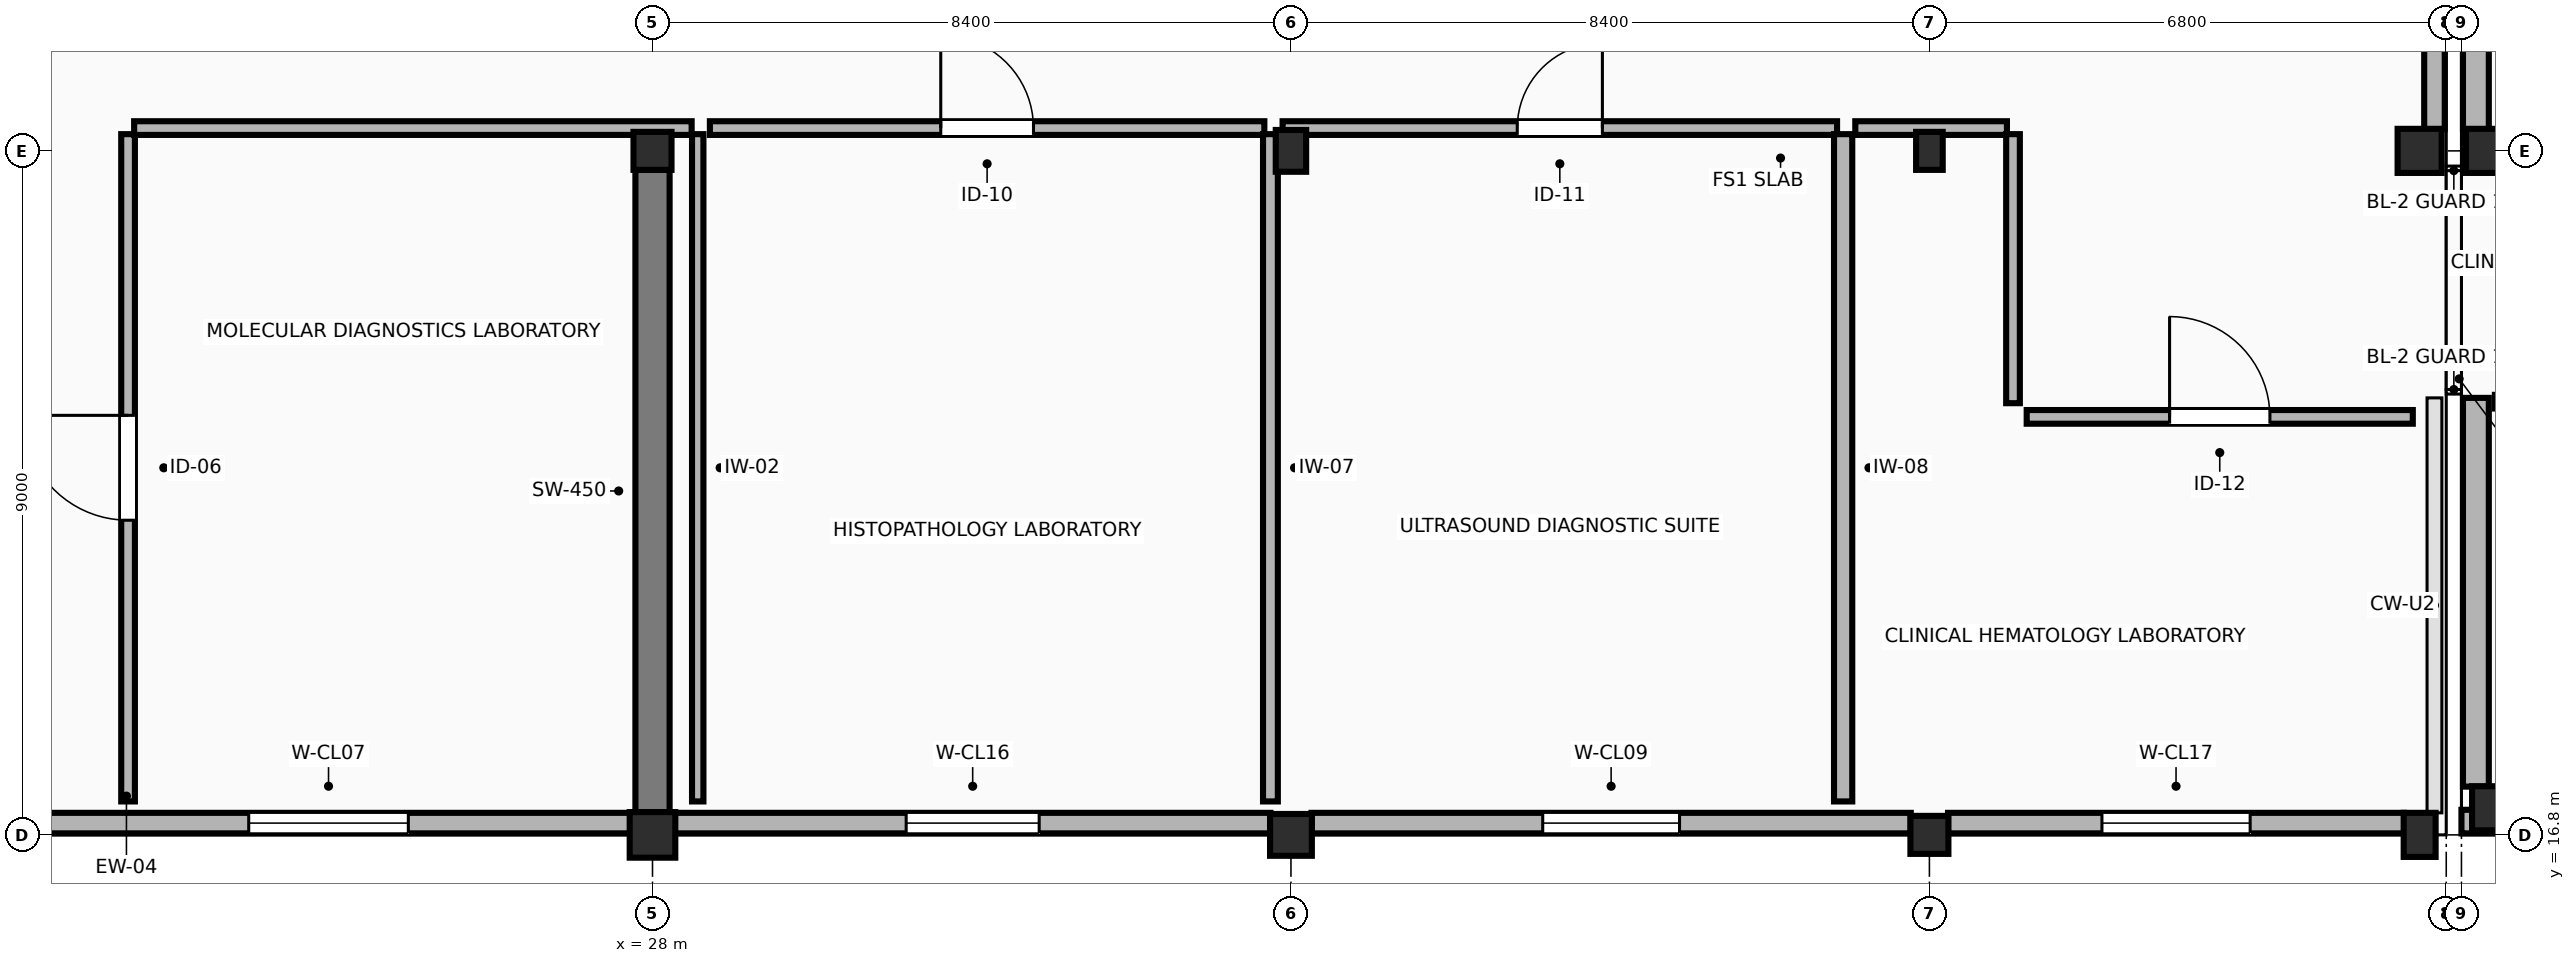
"""IFC4 building model, lengths in metres.
Left out: names, types, materials, properties, quantities, classifications, styles, units other than length and angle.
Written with IfcOpenShell. Run it as: python <this file> out.ifc"""

import sys

from ifc_helpers import new_model, si_unit, direction, frame, frame_2d, origin, origin_2d, place, context, subcontext, project, spatial, polyline, rectangle, outline, extrude, element, fill, save


model = new_model("IFC4")
c1 = context("Model", 3, precision=1e-05, world=origin(), true_north=direction((0.0, 1.0)))
c2 = subcontext(c1, "Body", "Model", "MODEL_VIEW")
j1 = project(units=[si_unit("LENGTHUNIT", "METRE"), si_unit("PLANEANGLEUNIT", "RADIAN")], contexts=[c1])
p1 = place(None, origin())
s1 = spatial("IfcSite", under=j1, at=p1, CompositionType="ELEMENT")
p2 = place(p1, origin())
s2 = spatial("IfcBuilding", under=s1, at=p2, CompositionType="ELEMENT")
p3 = place(p2, frame((0.0, 0.0, 9.6)))
s3 = spatial("IfcBuildingStorey", under=s2, at=p3, CompositionType="ELEMENT", Elevation=9.6)
p4 = place(p3, frame((28.0, 16.8, 0.0), z_axis=(0.0, 0.0, 1.0), x_axis=(1.0, 0.0, 0.0)))
e1 = element("IfcColumn", 1, at=p4, inside=s3, PredefinedType="COLUMN", context=c2, shape_type="SweptSolid", body=[
    extrude(rectangle(XDim=0.6, YDim=0.6, at=origin_2d()), origin(), (0.0, 0.0, 1.0), 4.2),
])
p5 = place(p3, frame((28.0, 25.8, 0.0), z_axis=(0.0, 0.0, 1.0), x_axis=(1.0, 0.0, 0.0)))
e2 = element("IfcColumn", 2, at=p5, inside=s3, PredefinedType="COLUMN", context=c2, shape_type="SweptSolid", body=[
    extrude(rectangle(XDim=0.5, YDim=0.5, at=origin_2d()), origin(), (0.0, 0.0, 1.0), 4.2),
])
p6 = place(p3, frame((36.4, 16.8, 0.0), z_axis=(0.0, 0.0, 1.0), x_axis=(1.0, 0.0, 0.0)))
e3 = element("IfcColumn", 3, at=p6, inside=s3, PredefinedType="COLUMN", context=c2, shape_type="SweptSolid", body=[
    extrude(rectangle(XDim=0.55, YDim=0.55, at=origin_2d()), origin(), (0.0, 0.0, 1.0), 4.2),
])
p7 = place(p3, frame((36.4, 25.8, 0.0), z_axis=(0.0, 0.0, 1.0), x_axis=(1.0, 0.0, 0.0)))
e4 = element("IfcColumn", 4, at=p7, inside=s3, PredefinedType="COLUMN", context=c2, shape_type="SweptSolid", body=[
    extrude(rectangle(XDim=0.4, YDim=0.55, at=origin_2d()), origin(), (0.0, 0.0, 1.0), 4.2),
])
p8 = place(p3, frame((44.8, 16.8, 0.0), z_axis=(0.0, 0.0, 1.0), x_axis=(1.0, 0.0, 0.0)))
e5 = element("IfcColumn", 5, at=p8, inside=s3, PredefinedType="COLUMN", context=c2, shape_type="SweptSolid", body=[
    extrude(rectangle(XDim=0.5, YDim=0.5, at=origin_2d()), origin(), (0.0, 0.0, 1.0), 4.2),
])
p9 = place(p3, frame((44.8, 25.8, 0.0), z_axis=(0.0, 0.0, 1.0), x_axis=(1.0, 0.0, 0.0)))
e6 = element("IfcColumn", 6, at=p9, inside=s3, PredefinedType="COLUMN", context=c2, shape_type="SweptSolid", body=[
    extrude(rectangle(XDim=0.35, YDim=0.5, at=origin_2d()), origin(), (0.0, 0.0, 1.0), 4.2),
])
p10 = place(p3, frame((51.25, 16.8, 0.0), z_axis=(0.0, 0.0, 1.0), x_axis=(1.0, 0.0, 0.0)))
e7 = element("IfcColumn", 7, at=p10, inside=s3, PredefinedType="COLUMN", context=c2, shape_type="SweptSolid", body=[
    extrude(rectangle(XDim=0.42, YDim=0.58, at=origin_2d()), origin(), (0.0, 0.0, 1.0), 4.2),
])
p11 = place(p3, frame((51.25, 25.8, 0.0), z_axis=(0.0, 0.0, 1.0), x_axis=(1.0, 0.0, 0.0)))
e8 = element("IfcColumn", 8, at=p11, inside=s3, PredefinedType="COLUMN", context=c2, shape_type="SweptSolid", body=[
    extrude(rectangle(XDim=0.58, YDim=0.58, at=origin_2d()), origin(), (0.0, 0.0, 1.0), 4.2),
])
p12 = place(p3, frame((52.15, 17.15, 0.0), z_axis=(0.0, 0.0, 1.0), x_axis=(1.0, 0.0, 0.0)))
e9 = element("IfcColumn", 9, at=p12, inside=s3, PredefinedType="COLUMN", context=c2, shape_type="SweptSolid", body=[
    extrude(rectangle(XDim=0.42, YDim=0.58, at=origin_2d()), origin(), (0.0, 0.0, 1.0), 4.2),
])
p13 = place(p3, frame((52.15, 25.8, 0.0), z_axis=(0.0, 0.0, 1.0), x_axis=(1.0, 0.0, 0.0)))
e10 = element("IfcColumn", 10, at=p13, inside=s3, PredefinedType="COLUMN", context=c2, shape_type="SweptSolid", body=[
    extrude(rectangle(XDim=0.58, YDim=0.58, at=origin_2d()), origin(), (0.0, 0.0, 1.0), 4.2),
])
p14 = place(p3, frame((19.77, 16.955, 0.0), z_axis=(0.0, 0.0, 1.0), x_axis=(1.0, 0.0, 0.0)))
e11 = element("IfcWall", 11, at=p14, inside=s3, PredefinedType="STANDARD", context=c2, shape_type="SweptSolid", body=[
    extrude(rectangle(XDim=7.935, YDim=0.27, at=frame_2d((3.968, 0.0))), origin(), (0.0, 0.0, 1.0), 3.255),
])
p15 = place(p14, frame((2.917, 0.0, 0.95)))
e12 = element("IfcOpeningElement", 12, at=p15, cuts=e11, PredefinedType="OPENING", context=c2, shape_type="SweptSolid", body=[
    extrude(rectangle(XDim=2.1, YDim=1.8, at=frame_2d((1.05, 0.9))), frame((0.0, 0.145, 0.0), z_axis=(0.0, -1.0, 0.0), x_axis=(1.0, 0.0, 0.0)), (0.0, 0.0, 1.0), 0.29),
])
p16 = place(p3, frame((28.295, 16.955, 0.0), z_axis=(0.0, 0.0, 1.0), x_axis=(1.0, 0.0, 0.0)))
e13 = element("IfcWall", 13, at=p16, inside=s3, PredefinedType="STANDARD", context=c2, shape_type="SweptSolid", body=[
    extrude(rectangle(XDim=7.835, YDim=0.27, at=frame_2d((3.917, 0.0))), origin(), (0.0, 0.0, 1.0), 3.255),
])
p17 = place(p16, frame((3.042, 0.0, 0.95)))
e14 = element("IfcOpeningElement", 14, at=p17, cuts=e13, PredefinedType="OPENING", context=c2, shape_type="SweptSolid", body=[
    extrude(rectangle(XDim=1.75, YDim=1.65, at=frame_2d((0.875, 0.825))), frame((0.0, 0.145, 0.0), z_axis=(0.0, -1.0, 0.0), x_axis=(1.0, 0.0, 0.0)), (0.0, 0.0, 1.0), 0.29),
])
p18 = place(p3, frame((36.67, 16.955, 0.0), z_axis=(0.0, 0.0, 1.0), x_axis=(1.0, 0.0, 0.0)))
e15 = element("IfcWall", 15, at=p18, inside=s3, PredefinedType="STANDARD", context=c2, shape_type="SweptSolid", body=[
    extrude(rectangle(XDim=7.885, YDim=0.27, at=frame_2d((3.942, 0.0))), origin(), (0.0, 0.0, 1.0), 3.225),
])
p19 = place(p18, frame((3.042, 0.0, 1.75)))
e16 = element("IfcOpeningElement", 16, at=p19, cuts=e15, PredefinedType="OPENING", context=c2, shape_type="SweptSolid", body=[
    extrude(rectangle(XDim=1.8, YDim=0.9, at=frame_2d((0.9, 0.45))), frame((0.0, 0.145, 0.0), z_axis=(0.0, -1.0, 0.0), x_axis=(1.0, 0.0, 0.0)), (0.0, 0.0, 1.0), 0.29),
])
p20 = place(p3, frame((45.045, 16.955, 0.0), z_axis=(0.0, 0.0, 1.0), x_axis=(1.0, 0.0, 0.0)))
e17 = element("IfcWall", 17, at=p20, inside=s3, PredefinedType="STANDARD", context=c2, shape_type="SweptSolid", body=[
    extrude(rectangle(XDim=6.0, YDim=0.27, at=frame_2d((3.0, 0.0))), origin(), (0.0, 0.0, 1.0), 3.425),
])
p21 = place(p20, frame((2.025, 0.0, 0.95)))
e18 = element("IfcOpeningElement", 18, at=p21, cuts=e17, PredefinedType="OPENING", context=c2, shape_type="SweptSolid", body=[
    extrude(rectangle(XDim=1.95, YDim=1.55, at=frame_2d((0.975, 0.775))), frame((0.0, 0.145, 0.0), z_axis=(0.0, -1.0, 0.0), x_axis=(1.0, 0.0, 0.0)), (0.0, 0.0, 1.0), 0.29),
])
p22 = place(p3, frame((51.445, 26.085, 0.0), z_axis=(0.0, 0.0, 1.0), x_axis=(0.0, 1.0, 0.0)))
e19 = element("IfcWall", 19, at=p22, inside=s3, PredefinedType="STANDARD", context=c2, shape_type="SweptSolid", body=[
    extrude(rectangle(XDim=8.28, YDim=0.27, at=frame_2d((4.14, 0.0))), origin(), (0.0, 0.0, 1.0), 3.335),
])
p23 = place(p3, frame((51.99, 34.015, 0.0), z_axis=(0.0, 0.0, 1.0), x_axis=(0.0, -1.0, 0.0)))
e20 = element("IfcWall", 20, at=p23, inside=s3, PredefinedType="STANDARD", context=c2, shape_type="SweptSolid", body=[
    extrude(rectangle(XDim=7.93, YDim=0.34, at=frame_2d((3.965, 0.0))), origin(), (0.0, 0.0, 1.0), 3.035),
])
p24 = place(p3, frame((51.99, 22.55, 0.0), z_axis=(0.0, 0.0, 1.0), x_axis=(0.0, -1.0, 0.0)))
e21 = element("IfcWall", 21, at=p24, inside=s3, PredefinedType="STANDARD", context=c2, shape_type="SweptSolid", body=[
    extrude(rectangle(XDim=5.115, YDim=0.34, at=frame_2d((2.558, 0.0))), origin(), (0.0, 0.0, 1.0), 3.035),
])
p25 = place(p3, frame((51.8, 16.975, 4.2), z_axis=(0.0, 0.0, 1.0), x_axis=(1.0, 0.0, 0.0)))
e22 = element("IfcWall", 22, at=p25, inside=s3, PredefinedType="STANDARD", context=c2, shape_type="SweptSolid", body=[
    extrude(outline(polyline([(0.0, 0.0), (9.6, 0.0), (9.6, 0.0), (4.8, 7.09), (0.0, 0.0), (0.0, 0.0)])), frame((0.0, 0.155, 0.0), z_axis=(0.0, -1.0, 0.0), x_axis=(1.0, 0.0, 0.0)), (0.0, 0.0, 1.0), 0.31),
])
p26 = place(p25, frame((2.622, 0.0, 0.75)))
e23 = element("IfcOpeningElement", 23, at=p26, cuts=e22, PredefinedType="OPENING", context=c2, shape_type="SweptSolid", body=[
    extrude(rectangle(XDim=0.9, YDim=0.9, at=frame_2d((0.45, 0.45))), frame((0.0, 0.165, 0.0), z_axis=(0.0, -1.0, 0.0), x_axis=(1.0, 0.0, 0.0)), (0.0, 0.0, 1.0), 0.33),
])
p27 = place(p25, frame((5.886, 0.0, 1.55)))
e24 = element("IfcOpeningElement", 24, at=p27, cuts=e22, PredefinedType="OPENING", context=c2, shape_type="SweptSolid", body=[
    extrude(rectangle(XDim=0.9, YDim=0.9, at=frame_2d((0.45, 0.45))), frame((0.0, 0.165, 0.0), z_axis=(0.0, -1.0, 0.0), x_axis=(1.0, 0.0, 0.0)), (0.0, 0.0, 1.0), 0.33),
])
p28 = place(p25, frame((4.35, 0.0, 3.35)))
e25 = element("IfcOpeningElement", 25, at=p28, cuts=e22, PredefinedType="OPENING", context=c2, shape_type="SweptSolid", body=[
    extrude(rectangle(XDim=0.9, YDim=0.9, at=frame_2d((0.45, 0.45))), frame((0.0, 0.165, 0.0), z_axis=(0.0, -1.0, 0.0), x_axis=(1.0, 0.0, 0.0)), (0.0, 0.0, 1.0), 0.33),
])
p29 = place(p3, frame((28.0, 17.1, 0.0), z_axis=(0.0, 0.0, 1.0), x_axis=(0.0, 1.0, 0.0)))
e26 = element("IfcWall", 26, at=p29, inside=s3, PredefinedType="SHEAR", context=c2, shape_type="SweptSolid", body=[
    extrude(rectangle(XDim=8.45, YDim=0.45, at=frame_2d((4.225, 0.0))), origin(), (0.0, 0.0, 1.0), 3.92),
])
p30 = place(p3, frame((21.1, 17.24, 0.0), z_axis=(0.0, 0.0, 1.0), x_axis=(0.0, 1.0, 0.0)))
e27 = element("IfcWall", 27, at=p30, inside=s3, PredefinedType="PARTITIONING", context=c2, shape_type="SweptSolid", body=[
    extrude(rectangle(XDim=8.78, YDim=0.18, at=frame_2d((4.39, 0.0))), origin(), (0.0, 0.0, 1.0), 3.92),
])
p31 = place(p30, frame((3.7, 0.0, 0.0)))
e28 = element("IfcOpeningElement", 28, at=p31, cuts=e27, PredefinedType="OPENING", context=c2, shape_type="SweptSolid", body=[
    extrude(rectangle(XDim=1.38, YDim=2.25, at=frame_2d((0.69, 1.125))), frame((0.0, 0.1, 0.0), z_axis=(0.0, -1.0, 0.0), x_axis=(1.0, 0.0, 0.0)), (0.0, 0.0, 1.0), 0.2),
])
p32 = place(p3, frame((21.18, 26.1, 0.0), z_axis=(0.0, 0.0, 1.0), x_axis=(1.0, 0.0, 0.0)))
e29 = element("IfcWall", 29, at=p32, inside=s3, PredefinedType="PARTITIONING", context=c2, shape_type="SweptSolid", body=[
    extrude(rectangle(XDim=7.335, YDim=0.18, at=frame_2d((3.667, 0.0))), origin(), (0.0, 0.0, 1.0), 3.255),
])
p33 = place(p3, frame((28.595, 26.02, 0.0), z_axis=(0.0, 0.0, 1.0), x_axis=(0.0, -1.0, 0.0)))
e30 = element("IfcWall", 30, at=p33, inside=s3, PredefinedType="PARTITIONING", context=c2, shape_type="SweptSolid", body=[
    extrude(rectangle(XDim=8.78, YDim=0.15, at=frame_2d((4.39, 0.0))), origin(), (0.0, 0.0, 1.0), 3.92),
])
p34 = place(p3, frame((28.755, 26.1, 0.0), z_axis=(0.0, 0.0, 1.0), x_axis=(1.0, 0.0, 0.0)))
e31 = element("IfcWall", 31, at=p34, inside=s3, PredefinedType="PARTITIONING", context=c2, shape_type="SweptSolid", body=[
    extrude(rectangle(XDim=7.295, YDim=0.18, at=frame_2d((3.647, 0.0))), origin(), (0.0, 0.0, 1.0), 3.255),
])
p35 = place(p34, frame((3.038, 0.0, 0.0)))
e32 = element("IfcOpeningElement", 32, at=p35, cuts=e31, PredefinedType="OPENING", context=c2, shape_type="SweptSolid", body=[
    extrude(rectangle(XDim=1.22, YDim=2.18, at=frame_2d((0.61, 1.09))), frame((0.0, 0.1, 0.0), z_axis=(0.0, -1.0, 0.0), x_axis=(1.0, 0.0, 0.0)), (0.0, 0.0, 1.0), 0.2),
])
p36 = place(p3, frame((36.13, 26.02, 0.0), z_axis=(0.0, 0.0, 1.0), x_axis=(0.0, -1.0, 0.0)))
e33 = element("IfcWall", 33, at=p36, inside=s3, PredefinedType="PARTITIONING", context=c2, shape_type="SweptSolid", body=[
    extrude(rectangle(XDim=8.78, YDim=0.195, at=frame_2d((4.39, 0.0))), origin(), (0.0, 0.0, 1.0), 3.375),
])
p37 = place(p3, frame((36.29, 26.1, 0.0), z_axis=(0.0, 0.0, 1.0), x_axis=(1.0, 0.0, 0.0)))
e34 = element("IfcWall", 34, at=p37, inside=s3, PredefinedType="PARTITIONING", context=c2, shape_type="SweptSolid", body=[
    extrude(rectangle(XDim=7.295, YDim=0.18, at=frame_2d((3.647, 0.0))), origin(), (0.0, 0.0, 1.0), 3.225),
])
p38 = place(p37, frame((3.087, 0.0, 0.0)))
e35 = element("IfcOpeningElement", 35, at=p38, cuts=e34, PredefinedType="OPENING", context=c2, shape_type="SweptSolid", body=[
    extrude(rectangle(XDim=1.12, YDim=2.16, at=frame_2d((0.56, 1.08))), frame((0.0, 0.1, 0.0), z_axis=(0.0, -1.0, 0.0), x_axis=(1.0, 0.0, 0.0)), (0.0, 0.0, 1.0), 0.2),
])
p39 = place(p3, frame((43.665, 26.02, 0.0), z_axis=(0.0, 0.0, 1.0), x_axis=(0.0, -1.0, 0.0)))
e36 = element("IfcWall", 36, at=p39, inside=s3, PredefinedType="PARTITIONING", context=c2, shape_type="SweptSolid", body=[
    extrude(rectangle(XDim=8.78, YDim=0.24, at=frame_2d((4.39, 0.0))), origin(), (0.0, 0.0, 1.0), 3.92),
])
p40 = place(p3, frame((43.825, 26.1, 0.0), z_axis=(0.0, 0.0, 1.0), x_axis=(1.0, 0.0, 0.0)))
e37 = element("IfcWall", 37, at=p40, inside=s3, PredefinedType="PARTITIONING", context=c2, shape_type="SweptSolid", body=[
    extrude(rectangle(XDim=1.995, YDim=0.18, at=frame_2d((0.998, 0.0))), origin(), (0.0, 0.0, 1.0), 3.225),
])
p41 = place(p3, frame((45.9, 26.02, 0.0), z_axis=(0.0, 0.0, 1.0), x_axis=(0.0, -1.0, 0.0)))
e38 = element("IfcWall", 38, at=p41, inside=s3, PredefinedType="PARTITIONING", context=c2, shape_type="SweptSolid", body=[
    extrude(rectangle(XDim=3.54, YDim=0.18, at=frame_2d((1.77, 0.0))), origin(), (0.0, 0.0, 1.0), 3.92),
])
p42 = place(p3, frame((46.08, 22.3, 0.0), z_axis=(0.0, 0.0, 1.0), x_axis=(1.0, 0.0, 0.0)))
e39 = element("IfcWall", 39, at=p42, inside=s3, PredefinedType="PARTITIONING", context=c2, shape_type="SweptSolid", body=[
    extrude(rectangle(XDim=5.08, YDim=0.18, at=frame_2d((2.54, 0.0))), origin(), (0.0, 0.0, 1.0), 3.92),
])
p43 = place(p42, frame((1.88, 0.0, 0.0)))
e40 = element("IfcOpeningElement", 40, at=p43, cuts=e39, PredefinedType="OPENING", context=c2, shape_type="SweptSolid", body=[
    extrude(rectangle(XDim=1.32, YDim=2.22, at=frame_2d((0.66, 1.11))), frame((0.0, 0.1, 0.0), z_axis=(0.0, -1.0, 0.0), x_axis=(1.0, 0.0, 0.0)), (0.0, 0.0, 1.0), 0.2),
])
p44 = place(p15, origin())
e41 = element("IfcWindow", 41, at=p44, inside=s3, PartitioningType="SINGLE_PANEL", PredefinedType="WINDOW", context=c2, shape_type="SweptSolid", body=[
    extrude(rectangle(XDim=2.1, YDim=1.8, at=frame_2d((1.05, 0.9))), frame((0.0, 0.03, 0.0), z_axis=(0.0, -1.0, 0.0), x_axis=(1.0, 0.0, 0.0)), (0.0, 0.0, 1.0), 0.06),
])
fill(e12, e41)
p45 = place(p17, origin())
e42 = element("IfcWindow", 42, at=p45, inside=s3, PartitioningType="SINGLE_PANEL", PredefinedType="WINDOW", context=c2, shape_type="SweptSolid", body=[
    extrude(rectangle(XDim=1.75, YDim=1.65, at=frame_2d((0.875, 0.825))), frame((0.0, 0.03, 0.0), z_axis=(0.0, -1.0, 0.0), x_axis=(1.0, 0.0, 0.0)), (0.0, 0.0, 1.0), 0.06),
])
fill(e14, e42)
p46 = place(p19, origin())
e43 = element("IfcWindow", 43, at=p46, inside=s3, PartitioningType="SINGLE_PANEL", PredefinedType="WINDOW", context=c2, shape_type="SweptSolid", body=[
    extrude(rectangle(XDim=1.8, YDim=0.9, at=frame_2d((0.9, 0.45))), frame((0.0, 0.03, 0.0), z_axis=(0.0, -1.0, 0.0), x_axis=(1.0, 0.0, 0.0)), (0.0, 0.0, 1.0), 0.06),
])
fill(e16, e43)
p47 = place(p21, origin())
e44 = element("IfcWindow", 44, at=p47, inside=s3, PartitioningType="SINGLE_PANEL", PredefinedType="WINDOW", context=c2, shape_type="SweptSolid", body=[
    extrude(rectangle(XDim=1.95, YDim=1.55, at=frame_2d((0.975, 0.775))), frame((0.0, 0.03, 0.0), z_axis=(0.0, -1.0, 0.0), x_axis=(1.0, 0.0, 0.0)), (0.0, 0.0, 1.0), 0.06),
])
fill(e18, e44)
p48 = place(p31, origin())
e45 = element("IfcDoor", 45, at=p48, inside=s3, OperationType="SINGLE_SWING_RIGHT", PredefinedType="DOOR", context=c2, shape_type="SweptSolid", body=[
    extrude(rectangle(XDim=1.38, YDim=2.25, at=frame_2d((0.69, 1.125))), frame((0.0, 0.025, 0.0), z_axis=(0.0, -1.0, 0.0), x_axis=(1.0, 0.0, 0.0)), (0.0, 0.0, 1.0), 0.05),
])
fill(e28, e45)
p49 = place(p35, origin())
e46 = element("IfcDoor", 46, at=p49, inside=s3, OperationType="SINGLE_SWING_LEFT", PredefinedType="DOOR", context=c2, shape_type="SweptSolid", body=[
    extrude(rectangle(XDim=1.22, YDim=2.18, at=frame_2d((0.61, 1.09))), frame((0.0, 0.025, 0.0), z_axis=(0.0, -1.0, 0.0), x_axis=(1.0, 0.0, 0.0)), (0.0, 0.0, 1.0), 0.05),
])
fill(e32, e46)
p50 = place(p38, origin())
e47 = element("IfcDoor", 47, at=p50, inside=s3, OperationType="SINGLE_SWING_RIGHT", PredefinedType="DOOR", context=c2, shape_type="SweptSolid", body=[
    extrude(rectangle(XDim=1.12, YDim=2.16, at=frame_2d((0.56, 1.08))), frame((0.0, 0.025, 0.0), z_axis=(0.0, -1.0, 0.0), x_axis=(1.0, 0.0, 0.0)), (0.0, 0.0, 1.0), 0.05),
])
fill(e35, e47)
p51 = place(p43, origin())
e48 = element("IfcDoor", 48, at=p51, inside=s3, OperationType="SINGLE_SWING_LEFT", PredefinedType="DOOR", context=c2, shape_type="SweptSolid", body=[
    extrude(rectangle(XDim=1.32, YDim=2.22, at=frame_2d((0.66, 1.11))), frame((0.0, 0.025, 0.0), z_axis=(0.0, -1.0, 0.0), x_axis=(1.0, 0.0, 0.0)), (0.0, 0.0, 1.0), 0.05),
])
fill(e40, e48)
save(model, sys.argv[1])
